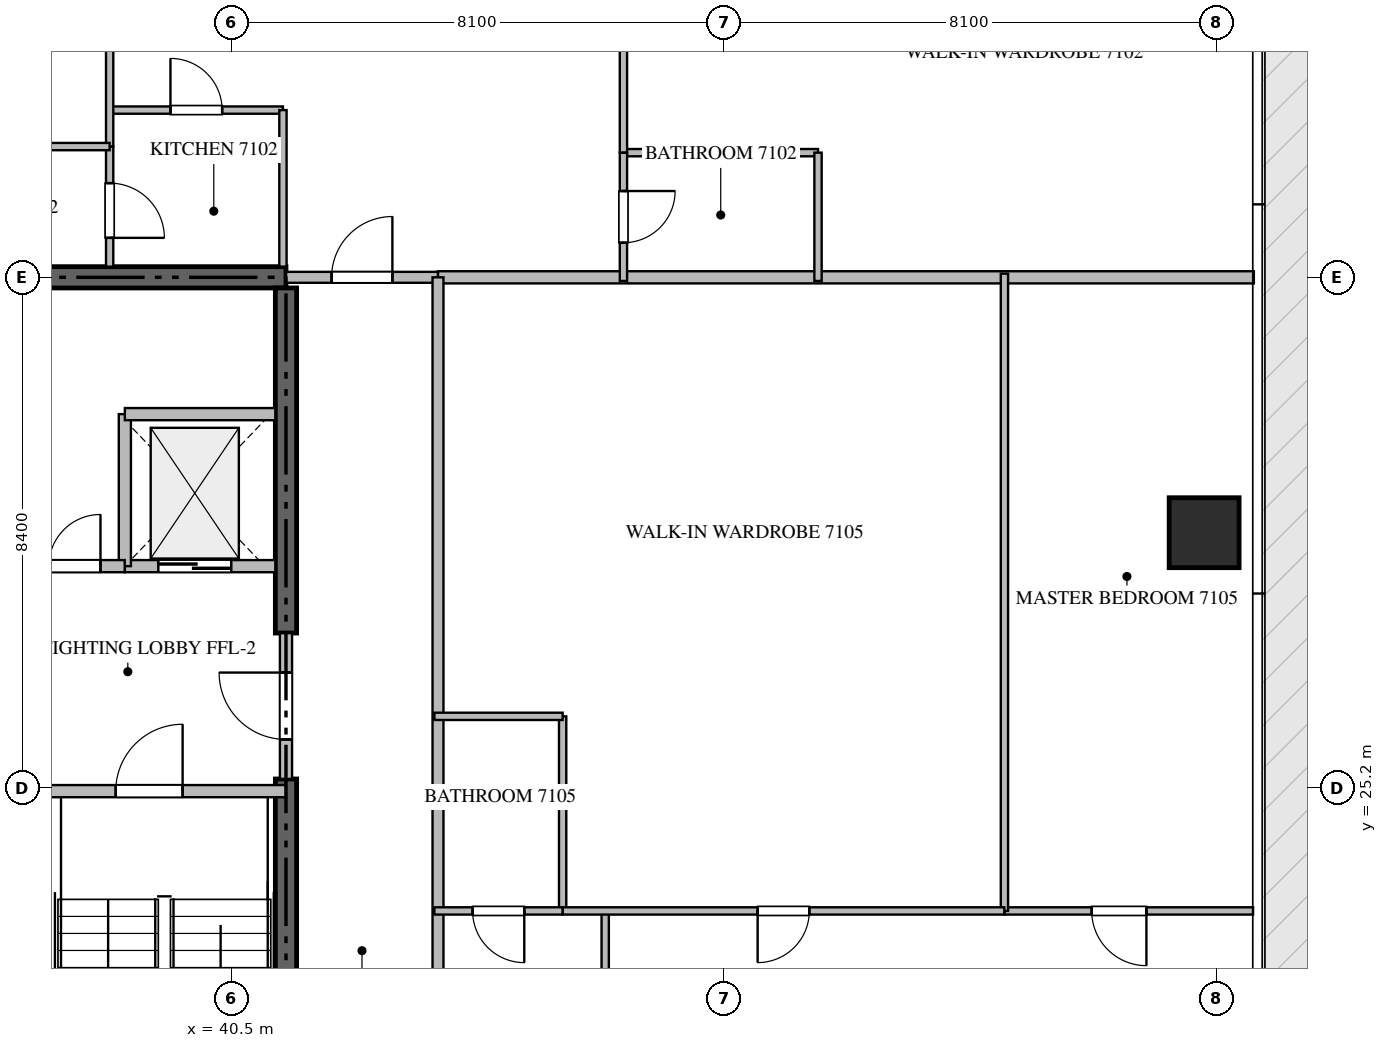
"""IFC4 building model, lengths in metres.
Left out: names, types, materials, properties, quantities, classifications, styles, units other than length and angle.
Written with IfcOpenShell. Run it as: python <this file> out.ifc"""

import sys

from ifc_helpers import new_model, si_unit, direction, frame, frame_2d, origin, origin_2d, place, context, subcontext, project, spatial, rectangle, extrude, source, transform, mapped, element, fill, save


model = new_model("IFC4")
c1 = context("Model", 3, precision=1e-05, world=origin(), true_north=direction((0.0, 1.0)))
c2 = subcontext(c1, "Body", "Model", "MODEL_VIEW")
j1 = project(units=[si_unit("LENGTHUNIT", "METRE"), si_unit("PLANEANGLEUNIT", "RADIAN")], contexts=[c1])
p1 = place(None, origin())
s1 = spatial("IfcSite", under=j1, at=p1, CompositionType="ELEMENT")
p2 = place(p1, origin())
s2 = spatial("IfcBuilding", under=s1, at=p2, CompositionType="ELEMENT")
p3 = place(p2, frame((0.0, 0.0, 283.6)))
s3 = spatial("IfcBuildingStorey", under=s2, at=p3, CompositionType="ELEMENT", Elevation=283.6)
p4 = place(p3, frame((41.4, 33.6, -0.26), z_axis=(0.0, 0.0, 1.0), x_axis=(-1.0, 0.0, 0.0)))
e1 = element("IfcWall", 1, at=p4, inside=s3, PredefinedType="SHEAR", context=c2, shape_type="SweptSolid", body=[
    extrude(rectangle(XDim=18.0, YDim=0.35, at=frame_2d((9.0, 0.0))), origin(), (0.0, 0.0, 1.0), 3.668),
])
p5 = place(p3, frame((41.4, 16.975, -0.26), z_axis=(0.0, 0.0, 1.0), x_axis=(0.0, 1.0, 0.0)))
e2 = element("IfcWall", 2, at=p5, inside=s3, PredefinedType="SHEAR", context=c2, shape_type="SweptSolid", body=[
    extrude(rectangle(XDim=8.375, YDim=0.35, at=frame_2d((4.188, 0.0))), origin(), (0.0, 0.0, 1.0), 3.668),
])
p6 = place(p3, frame((41.4, 27.75, -0.26), z_axis=(0.0, 0.0, 1.0), x_axis=(0.0, 1.0, 0.0)))
e3 = element("IfcWall", 3, at=p6, inside=s3, PredefinedType="SHEAR", context=c2, shape_type="SweptSolid", body=[
    extrude(rectangle(XDim=5.675, YDim=0.35, at=frame_2d((2.837, 0.0))), origin(), (0.0, 0.0, 1.0), 3.668),
])
m1 = source(origin(), c2, "Body", "SweptSolid", [
    extrude(rectangle(XDim=1.15, YDim=1.15, at=origin_2d()), origin(), (0.0, 0.0, 1.0), 3.67),
])
p7 = place(p3, frame((56.5, 29.4, -0.26), z_axis=(0.0, 0.0, 1.0), x_axis=(1.0, 0.0, 0.0)))
e4 = element("IfcColumn", 4, at=p7, inside=s3, PredefinedType="COLUMN", context=c2, shape_type="MappedRepresentation", body=[
    mapped(m1, transform((0.0, 0.0, 0.0), scale=1.0)),
])
p8 = place(p3, frame((36.95, 25.15, 0.0), z_axis=(0.0, 0.0, 1.0), x_axis=(1.0, 0.0, 0.0)))
e5 = element("IfcWall", 5, at=p8, inside=s3, PredefinedType="STANDARD", context=c2, shape_type="SweptSolid", body=[
    extrude(rectangle(XDim=4.45, YDim=0.2, at=frame_2d((2.225, 0.0))), origin(), (0.0, 0.0, 1.0), 3.41),
])
p9 = place(p8, frame((1.65, 0.0, 0.0)))
e6 = element("IfcOpeningElement", 6, at=p9, cuts=e5, PredefinedType="OPENING", context=c2, shape_type="SweptSolid", body=[
    extrude(rectangle(XDim=1.1, YDim=2.15, at=frame_2d((0.55, 1.075))), frame((0.0, 0.11, 0.0), z_axis=(0.0, -1.0, 0.0), x_axis=(1.0, 0.0, 0.0)), (0.0, 0.0, 1.0), 0.22),
])
p10 = place(p3, frame((38.75, 28.85, 0.0), z_axis=(0.0, 0.0, 1.0), x_axis=(1.0, 0.0, 0.0)))
e7 = element("IfcWall", 7, at=p10, inside=s3, PredefinedType="STANDARD", context=c2, shape_type="SweptSolid", body=[
    extrude(rectangle(XDim=2.475, YDim=0.2, at=frame_2d((1.238, 0.0))), origin(), (0.0, 0.0, 1.0), 3.41),
])
p11 = place(p10, frame((0.55, 0.0, 0.0)))
e8 = element("IfcOpeningElement", 8, at=p11, cuts=e7, PredefinedType="OPENING", context=c2, shape_type="SweptSolid", body=[
    extrude(rectangle(XDim=1.2, YDim=2.2, at=frame_2d((0.6, 1.1))), frame((0.0, 0.11, 0.0), z_axis=(0.0, -1.0, 0.0), x_axis=(1.0, 0.0, 0.0)), (0.0, 0.0, 1.0), 0.22),
])
p12 = place(p3, frame((38.75, 28.85, 0.0), z_axis=(0.0, 0.0, 1.0), x_axis=(0.0, 1.0, 0.0)))
e9 = element("IfcWall", 9, at=p12, inside=s3, PredefinedType="STANDARD", context=c2, shape_type="SweptSolid", body=[
    extrude(rectangle(XDim=2.5, YDim=0.2, at=frame_2d((1.25, 0.0))), origin(), (0.0, 0.0, 1.0), 3.41),
])
p13 = place(p3, frame((38.75, 31.35, 0.0), z_axis=(0.0, 0.0, 1.0), x_axis=(1.0, 0.0, 0.0)))
e10 = element("IfcWall", 10, at=p13, inside=s3, PredefinedType="STANDARD", context=c2, shape_type="SweptSolid", body=[
    extrude(rectangle(XDim=2.475, YDim=0.2, at=frame_2d((1.238, 0.0))), origin(), (0.0, 0.0, 1.0), 3.41),
])
p14 = place(p3, frame((37.1, 28.85, 0.0), z_axis=(0.0, 0.0, 1.0), x_axis=(1.0, 0.0, 0.0)))
e11 = element("IfcWall", 11, at=p14, inside=s3, PredefinedType="STANDARD", context=c2, shape_type="SweptSolid", body=[
    extrude(rectangle(XDim=1.648, YDim=0.2, at=frame_2d((0.824, 0.0))), origin(), (0.0, 0.0, 1.0), 3.41),
])
p15 = place(p14, frame((0.399, 0.0, 0.0)))
e12 = element("IfcOpeningElement", 12, at=p15, cuts=e11, PredefinedType="OPENING", context=c2, shape_type="SweptSolid", body=[
    extrude(rectangle(XDim=0.85, YDim=2.1, at=frame_2d((0.425, 1.05))), frame((0.0, 0.11, 0.0), z_axis=(0.0, -1.0, 0.0), x_axis=(1.0, 0.0, 0.0)), (0.0, 0.0, 1.0), 0.22),
])
p16 = place(p3, frame((41.4, 25.352, 0.0), z_axis=(0.0, 0.0, 1.0), x_axis=(0.0, 1.0, 0.0)))
e13 = element("IfcWall", 13, at=p16, inside=s3, PredefinedType="STANDARD", context=c2, shape_type="SweptSolid", body=[
    extrude(rectangle(XDim=2.396, YDim=0.2, at=frame_2d((1.198, 0.0))), origin(), (0.0, 0.0, 1.0), 3.41),
])
p17 = place(p16, frame((0.648, 0.0, 0.0)))
e14 = element("IfcOpeningElement", 14, at=p17, cuts=e13, PredefinedType="OPENING", context=c2, shape_type="SweptSolid", body=[
    extrude(rectangle(XDim=1.1, YDim=2.15, at=frame_2d((0.55, 1.075))), frame((0.0, 0.11, 0.0), z_axis=(0.0, -1.0, 0.0), x_axis=(1.0, 0.0, 0.0)), (0.0, 0.0, 1.0), 0.22),
])
p18 = place(p3, frame((43.9, 33.6, 0.0), z_axis=(0.0, 0.0, 1.0), x_axis=(1.0, 0.0, 0.0)))
e15 = element("IfcWall", 15, at=p18, inside=s3, PredefinedType="PARTITIONING", context=c2, shape_type="SweptSolid", body=[
    extrude(rectangle(XDim=13.418, YDim=0.2, at=frame_2d((6.709, 0.0))), origin(), (0.0, 0.0, 1.0), 3.41),
])
p19 = place(p3, frame((41.402, 33.6, 0.0), z_axis=(0.0, 0.0, 1.0), x_axis=(1.0, 0.0, 0.0)))
e16 = element("IfcWall", 16, at=p19, inside=s3, PredefinedType="PARTITIONING", context=c2, shape_type="SweptSolid", body=[
    extrude(rectangle(XDim=2.496, YDim=0.18, at=frame_2d((1.248, 0.0))), origin(), (0.0, 0.0, 1.0), 3.41),
])
p20 = place(p19, frame((0.748, 0.0, 0.0)))
e17 = element("IfcOpeningElement", 17, at=p20, cuts=e16, PredefinedType="OPENING", context=c2, shape_type="SweptSolid", body=[
    extrude(rectangle(XDim=1.0, YDim=2.15, at=frame_2d((0.5, 1.075))), frame((0.0, 0.1, 0.0), z_axis=(0.0, -1.0, 0.0), x_axis=(1.0, 0.0, 0.0)), (0.0, 0.0, 1.0), 0.2),
])
p21 = place(p3, frame((43.9, 16.8, 0.0), z_axis=(0.0, 0.0, 1.0), x_axis=(0.0, 1.0, 0.0)))
e18 = element("IfcWall", 18, at=p21, inside=s3, PredefinedType="PARTITIONING", context=c2, shape_type="SweptSolid", body=[
    extrude(rectangle(XDim=16.8, YDim=0.18, at=frame_2d((8.4, 0.0))), origin(), (0.0, 0.0, 1.0), 3.41),
])
p22 = place(p21, frame((1.3, 0.0, 0.0)))
e19 = element("IfcOpeningElement", 19, at=p22, cuts=e18, PredefinedType="OPENING", context=c2, shape_type="SweptSolid", body=[
    extrude(rectangle(XDim=1.0, YDim=2.15, at=frame_2d((0.5, 1.075))), frame((0.0, 0.1, 0.0), z_axis=(0.0, -1.0, 0.0), x_axis=(1.0, 0.0, 0.0)), (0.0, 0.0, 1.0), 0.2),
])
p23 = place(p3, frame((38.5, 36.35, 0.0), z_axis=(0.0, 0.0, 1.0), x_axis=(1.0, 0.0, 0.0)))
e20 = element("IfcWall", 20, at=p23, inside=s3, PredefinedType="PARTITIONING", context=c2, shape_type="SweptSolid", body=[
    extrude(rectangle(XDim=2.85, YDim=0.12, at=frame_2d((1.425, 0.0))), origin(), (0.0, 0.0, 1.0), 3.41),
])
p24 = place(p23, frame((1.0, 0.0, 0.0)))
e21 = element("IfcOpeningElement", 21, at=p24, cuts=e20, PredefinedType="OPENING", context=c2, shape_type="SweptSolid", body=[
    extrude(rectangle(XDim=0.85, YDim=2.1, at=frame_2d((0.425, 1.05))), frame((0.0, 0.07, 0.0), z_axis=(0.0, -1.0, 0.0), x_axis=(1.0, 0.0, 0.0)), (0.0, 0.0, 1.0), 0.14),
])
p25 = place(p3, frame((41.35, 36.35, 0.0), z_axis=(0.0, 0.0, 1.0), x_axis=(0.0, -1.0, 0.0)))
e22 = element("IfcWall", 22, at=p25, inside=s3, PredefinedType="PARTITIONING", context=c2, shape_type="SweptSolid", body=[
    extrude(rectangle(XDim=2.575, YDim=0.12, at=frame_2d((1.288, 0.0))), origin(), (0.0, 0.0, 1.0), 3.41),
])
p26 = place(p3, frame((38.5, 35.75, 0.0), z_axis=(0.0, 0.0, 1.0), x_axis=(0.0, -1.0, 0.0)))
e23 = element("IfcWall", 23, at=p26, inside=s3, PredefinedType="PARTITIONING", context=c2, shape_type="SweptSolid", body=[
    extrude(rectangle(XDim=1.975, YDim=0.12, at=frame_2d((0.988, 0.0))), origin(), (0.0, 0.0, 1.0), 3.41),
])
p27 = place(p26, frame((0.601, 0.0, 0.0)))
e24 = element("IfcOpeningElement", 24, at=p27, cuts=e23, PredefinedType="OPENING", context=c2, shape_type="SweptSolid", body=[
    extrude(rectangle(XDim=0.9, YDim=2.1, at=frame_2d((0.45, 1.05))), frame((0.0, 0.07, 0.0), z_axis=(0.0, -1.0, 0.0), x_axis=(1.0, 0.0, 0.0)), (0.0, 0.0, 1.0), 0.14),
])
p28 = place(p3, frame((38.5, 42.248, 0.0), z_axis=(0.0, 0.0, 1.0), x_axis=(0.0, -1.0, 0.0)))
e25 = element("IfcWall", 25, at=p28, inside=s3, PredefinedType="PARTITIONING", context=c2, shape_type="SweptSolid", body=[
    extrude(rectangle(XDim=6.496, YDim=0.12, at=frame_2d((3.248, 0.0))), origin(), (0.0, 0.0, 1.0), 3.41),
])
p29 = place(p3, frame((35.452, 35.75, 0.0), z_axis=(0.0, 0.0, 1.0), x_axis=(1.0, 0.0, 0.0)))
e26 = element("IfcWall", 26, at=p29, inside=s3, PredefinedType="PARTITIONING", context=c2, shape_type="SweptSolid", body=[
    extrude(rectangle(XDim=3.048, YDim=0.12, at=frame_2d((1.524, 0.0))), origin(), (0.0, 0.0, 1.0), 3.41),
])
p30 = place(p29, frame((1.099, 0.0, 0.0)))
e27 = element("IfcOpeningElement", 27, at=p30, cuts=e26, PredefinedType="OPENING", context=c2, shape_type="SweptSolid", body=[
    extrude(rectangle(XDim=0.85, YDim=2.1, at=frame_2d((0.425, 1.05))), frame((0.0, 0.07, 0.0), z_axis=(0.0, -1.0, 0.0), x_axis=(1.0, 0.0, 0.0)), (0.0, 0.0, 1.0), 0.14),
])
p31 = place(p3, frame((46.95, 35.65, 0.0), z_axis=(0.0, 0.0, 1.0), x_axis=(1.0, 0.0, 0.0)))
e28 = element("IfcWall", 28, at=p31, inside=s3, PredefinedType="PARTITIONING", context=c2, shape_type="SweptSolid", body=[
    extrude(rectangle(XDim=3.2, YDim=0.12, at=frame_2d((1.6, 0.0))), origin(), (0.0, 0.0, 1.0), 3.41),
])
p32 = place(p3, frame((50.15, 35.65, 0.0), z_axis=(0.0, 0.0, 1.0), x_axis=(0.0, -1.0, 0.0)))
e29 = element("IfcWall", 29, at=p32, inside=s3, PredefinedType="PARTITIONING", context=c2, shape_type="SweptSolid", body=[
    extrude(rectangle(XDim=2.11, YDim=0.12, at=frame_2d((1.055, 0.0))), origin(), (0.0, 0.0, 1.0), 3.41),
])
p33 = place(p3, frame((46.95, 41.73, 0.0), z_axis=(0.0, 0.0, 1.0), x_axis=(0.0, -1.0, 0.0)))
e30 = element("IfcWall", 30, at=p33, inside=s3, PredefinedType="PARTITIONING", context=c2, shape_type="SweptSolid", body=[
    extrude(rectangle(XDim=6.08, YDim=0.12, at=frame_2d((3.04, 0.0))), origin(), (0.0, 0.0, 1.0), 3.41),
])
p34 = place(p33, frame((2.615, 0.0, 0.0)))
e31 = element("IfcOpeningElement", 31, at=p34, cuts=e30, PredefinedType="OPENING", context=c2, shape_type="SweptSolid", body=[
    extrude(rectangle(XDim=0.85, YDim=2.1, at=frame_2d((0.425, 1.05))), frame((0.0, 0.07, 0.0), z_axis=(0.0, -1.0, 0.0), x_axis=(1.0, 0.0, 0.0)), (0.0, 0.0, 1.0), 0.14),
])
p35 = place(p3, frame((46.95, 35.648, 0.0), z_axis=(0.0, 0.0, 1.0), x_axis=(0.0, -1.0, 0.0)))
e32 = element("IfcWall", 32, at=p35, inside=s3, PredefinedType="PARTITIONING", context=c2, shape_type="SweptSolid", body=[
    extrude(rectangle(XDim=2.108, YDim=0.12, at=frame_2d((1.054, 0.0))), origin(), (0.0, 0.0, 1.0), 3.41),
])
p36 = place(p35, frame((0.629, 0.0, 0.0)))
e33 = element("IfcOpeningElement", 33, at=p36, cuts=e32, PredefinedType="OPENING", context=c2, shape_type="SweptSolid", body=[
    extrude(rectangle(XDim=0.85, YDim=2.1, at=frame_2d((0.425, 1.05))), frame((0.0, 0.07, 0.0), z_axis=(0.0, -1.0, 0.0), x_axis=(1.0, 0.0, 0.0)), (0.0, 0.0, 1.0), 0.14),
])
p37 = place(p3, frame((46.65, 19.4, 0.0), z_axis=(0.0, 0.0, 1.0), x_axis=(0.0, 1.0, 0.0)))
e34 = element("IfcWall", 34, at=p37, inside=s3, PredefinedType="PARTITIONING", context=c2, shape_type="SweptSolid", body=[
    extrude(rectangle(XDim=3.78, YDim=0.12, at=frame_2d((1.89, 0.0))), origin(), (0.0, 0.0, 1.0), 3.41),
])
p38 = place(p37, frame((1.465, 0.0, 0.0)))
e35 = element("IfcOpeningElement", 35, at=p38, cuts=e34, PredefinedType="OPENING", context=c2, shape_type="SweptSolid", body=[
    extrude(rectangle(XDim=0.85, YDim=2.1, at=frame_2d((0.425, 1.05))), frame((0.0, 0.07, 0.0), z_axis=(0.0, -1.0, 0.0), x_axis=(1.0, 0.0, 0.0)), (0.0, 0.0, 1.0), 0.14),
])
p39 = place(p3, frame((57.305, 23.18, 0.0), z_axis=(0.0, 0.0, 1.0), x_axis=(-1.0, 0.0, 0.0)))
e36 = element("IfcWall", 36, at=p39, inside=s3, PredefinedType="PARTITIONING", context=c2, shape_type="SweptSolid", body=[
    extrude(rectangle(XDim=4.089, YDim=0.12, at=frame_2d((2.044, 0.0))), origin(), (0.0, 0.0, 1.0), 3.41),
])
p40 = place(p39, frame((1.754, 0.0, 0.0)))
e37 = element("IfcOpeningElement", 37, at=p40, cuts=e36, PredefinedType="OPENING", context=c2, shape_type="SweptSolid", body=[
    extrude(rectangle(XDim=0.9, YDim=2.1, at=frame_2d((0.45, 1.05))), frame((0.0, 0.07, 0.0), z_axis=(0.0, -1.0, 0.0), x_axis=(1.0, 0.0, 0.0)), (0.0, 0.0, 1.0), 0.14),
])
p41 = place(p3, frame((53.216, 23.18, 0.0), z_axis=(0.0, 0.0, 1.0), x_axis=(0.0, 1.0, 0.0)))
e38 = element("IfcWall", 38, at=p41, inside=s3, PredefinedType="PARTITIONING", context=c2, shape_type="SweptSolid", body=[
    extrude(rectangle(XDim=10.48, YDim=0.12, at=frame_2d((5.24, 0.0))), origin(), (0.0, 0.0, 1.0), 3.41),
])
p42 = place(p3, frame((45.95, 23.18, 0.0), z_axis=(0.0, 0.0, 1.0), x_axis=(0.0, 1.0, 0.0)))
e39 = element("IfcWall", 39, at=p42, inside=s3, PredefinedType="PARTITIONING", context=c2, shape_type="SweptSolid", body=[
    extrude(rectangle(XDim=3.2, YDim=0.12, at=frame_2d((1.6, 0.0))), origin(), (0.0, 0.0, 1.0), 3.41),
])
p43 = place(p3, frame((45.95, 26.38, 0.0), z_axis=(0.0, 0.0, 1.0), x_axis=(-1.0, 0.0, 0.0)))
e40 = element("IfcWall", 40, at=p43, inside=s3, PredefinedType="PARTITIONING", context=c2, shape_type="SweptSolid", body=[
    extrude(rectangle(XDim=2.11, YDim=0.12, at=frame_2d((1.055, 0.0))), origin(), (0.0, 0.0, 1.0), 3.41),
])
p44 = place(p3, frame((53.214, 23.18, 0.0), z_axis=(0.0, 0.0, 1.0), x_axis=(-1.0, 0.0, 0.0)))
e41 = element("IfcWall", 41, at=p44, inside=s3, PredefinedType="PARTITIONING", context=c2, shape_type="SweptSolid", body=[
    extrude(rectangle(XDim=7.264, YDim=0.12, at=frame_2d((3.632, 0.0))), origin(), (0.0, 0.0, 1.0), 3.41),
])
p45 = place(p44, frame((3.207, 0.0, 0.0)))
e42 = element("IfcOpeningElement", 42, at=p45, cuts=e41, PredefinedType="OPENING", context=c2, shape_type="SweptSolid", body=[
    extrude(rectangle(XDim=0.85, YDim=2.1, at=frame_2d((0.425, 1.05))), frame((0.0, 0.07, 0.0), z_axis=(0.0, -1.0, 0.0), x_axis=(1.0, 0.0, 0.0)), (0.0, 0.0, 1.0), 0.14),
])
p46 = place(p3, frame((45.948, 23.18, 0.0), z_axis=(0.0, 0.0, 1.0), x_axis=(-1.0, 0.0, 0.0)))
e43 = element("IfcWall", 43, at=p46, inside=s3, PredefinedType="PARTITIONING", context=c2, shape_type="SweptSolid", body=[
    extrude(rectangle(XDim=2.108, YDim=0.12, at=frame_2d((1.054, 0.0))), origin(), (0.0, 0.0, 1.0), 3.41),
])
p47 = place(p46, frame((0.629, 0.0, 0.0)))
e44 = element("IfcOpeningElement", 44, at=p47, cuts=e43, PredefinedType="OPENING", context=c2, shape_type="SweptSolid", body=[
    extrude(rectangle(XDim=0.85, YDim=2.1, at=frame_2d((0.425, 1.05))), frame((0.0, 0.07, 0.0), z_axis=(0.0, -1.0, 0.0), x_axis=(1.0, 0.0, 0.0)), (0.0, 0.0, 1.0), 0.14),
])
m2 = source(origin(), c2, "Body", "SweptSolid", [
    extrude(rectangle(XDim=1.1, YDim=2.15, at=frame_2d((0.55, 1.075))), frame((0.0, 0.025, 0.0), z_axis=(0.0, -1.0, 0.0), x_axis=(1.0, 0.0, 0.0)), (0.0, 0.0, 1.0), 0.05),
])
p48 = place(p9, origin())
e45 = element("IfcDoor", 45, at=p48, inside=s3, OperationType="SINGLE_SWING_RIGHT", PredefinedType="DOOR", context=c2, shape_type="MappedRepresentation", body=[
    mapped(m2, transform((0.0, 0.0, 0.0), scale=1.0)),
])
fill(e6, e45)
m3 = source(origin(), c2, "Body", "SweptSolid", [
    extrude(rectangle(XDim=1.2, YDim=2.2, at=frame_2d((0.6, 1.1))), frame((0.0, 0.025, 0.0), z_axis=(0.0, -1.0, 0.0), x_axis=(1.0, 0.0, 0.0)), (0.0, 0.0, 1.0), 0.05),
])
p49 = place(p11, origin())
e46 = element("IfcDoor", 46, at=p49, inside=s3, OperationType="DOUBLE_DOOR_SLIDING", PredefinedType="DOOR", context=c2, shape_type="MappedRepresentation", body=[
    mapped(m3, transform((0.0, 0.0, 0.0), scale=1.0)),
])
fill(e8, e46)
m4 = source(origin(), c2, "Body", "SweptSolid", [
    extrude(rectangle(XDim=0.85, YDim=2.1, at=frame_2d((0.425, 1.05))), frame((0.0, 0.025, 0.0), z_axis=(0.0, -1.0, 0.0), x_axis=(1.0, 0.0, 0.0)), (0.0, 0.0, 1.0), 0.05),
])
p50 = place(p15, origin())
e47 = element("IfcDoor", 47, at=p50, inside=s3, OperationType="SINGLE_SWING_RIGHT", PredefinedType="DOOR", context=c2, shape_type="MappedRepresentation", body=[
    mapped(m4, transform((0.0, 0.0, 0.0), scale=1.0)),
])
fill(e12, e47)
p51 = place(p17, origin())
e48 = element("IfcDoor", 48, at=p51, inside=s3, OperationType="SINGLE_SWING_RIGHT", PredefinedType="DOOR", context=c2, shape_type="MappedRepresentation", body=[
    mapped(m2, transform((0.0, 0.0, 0.0), scale=1.0)),
])
fill(e14, e48)
m5 = source(origin(), c2, "Body", "SweptSolid", [
    extrude(rectangle(XDim=1.0, YDim=2.15, at=frame_2d((0.5, 1.075))), frame((0.0, 0.025, 0.0), z_axis=(0.0, -1.0, 0.0), x_axis=(1.0, 0.0, 0.0)), (0.0, 0.0, 1.0), 0.05),
])
p52 = place(p20, origin())
e49 = element("IfcDoor", 49, at=p52, inside=s3, OperationType="SINGLE_SWING_RIGHT", PredefinedType="DOOR", context=c2, shape_type="MappedRepresentation", body=[
    mapped(m5, transform((0.0, 0.0, 0.0), scale=1.0)),
])
fill(e17, e49)
p53 = place(p24, origin())
e50 = element("IfcDoor", 50, at=p53, inside=s3, OperationType="SINGLE_SWING_LEFT", PredefinedType="DOOR", context=c2, shape_type="MappedRepresentation", body=[
    mapped(m4, transform((0.0, 0.0, 0.0), scale=1.0)),
])
fill(e21, e50)
m6 = source(origin(), c2, "Body", "SweptSolid", [
    extrude(rectangle(XDim=0.9, YDim=2.1, at=frame_2d((0.45, 1.05))), frame((0.0, 0.025, 0.0), z_axis=(0.0, -1.0, 0.0), x_axis=(1.0, 0.0, 0.0)), (0.0, 0.0, 1.0), 0.05),
])
p54 = place(p27, origin())
e51 = element("IfcDoor", 51, at=p54, inside=s3, OperationType="SINGLE_SWING_RIGHT", PredefinedType="DOOR", context=c2, shape_type="MappedRepresentation", body=[
    mapped(m6, transform((0.0, 0.0, 0.0), scale=1.0)),
])
fill(e24, e51)
p55 = place(p36, origin())
e52 = element("IfcDoor", 52, at=p55, inside=s3, OperationType="SINGLE_SWING_LEFT", PredefinedType="DOOR", context=c2, shape_type="MappedRepresentation", body=[
    mapped(m4, transform((0.0, 0.0, 0.0), scale=1.0)),
])
fill(e33, e52)
p56 = place(p40, origin())
e53 = element("IfcDoor", 53, at=p56, inside=s3, OperationType="SINGLE_SWING_LEFT", PredefinedType="DOOR", context=c2, shape_type="MappedRepresentation", body=[
    mapped(m6, transform((0.0, 0.0, 0.0), scale=1.0)),
])
fill(e37, e53)
p57 = place(p45, origin())
e54 = element("IfcDoor", 54, at=p57, inside=s3, OperationType="SINGLE_SWING_RIGHT", PredefinedType="DOOR", context=c2, shape_type="MappedRepresentation", body=[
    mapped(m4, transform((0.0, 0.0, 0.0), scale=1.0)),
])
fill(e42, e54)
p58 = place(p47, origin())
e55 = element("IfcDoor", 55, at=p58, inside=s3, OperationType="SINGLE_SWING_LEFT", PredefinedType="DOOR", context=c2, shape_type="MappedRepresentation", body=[
    mapped(m4, transform((0.0, 0.0, 0.0), scale=1.0)),
])
fill(e44, e55)
save(model, sys.argv[1])
